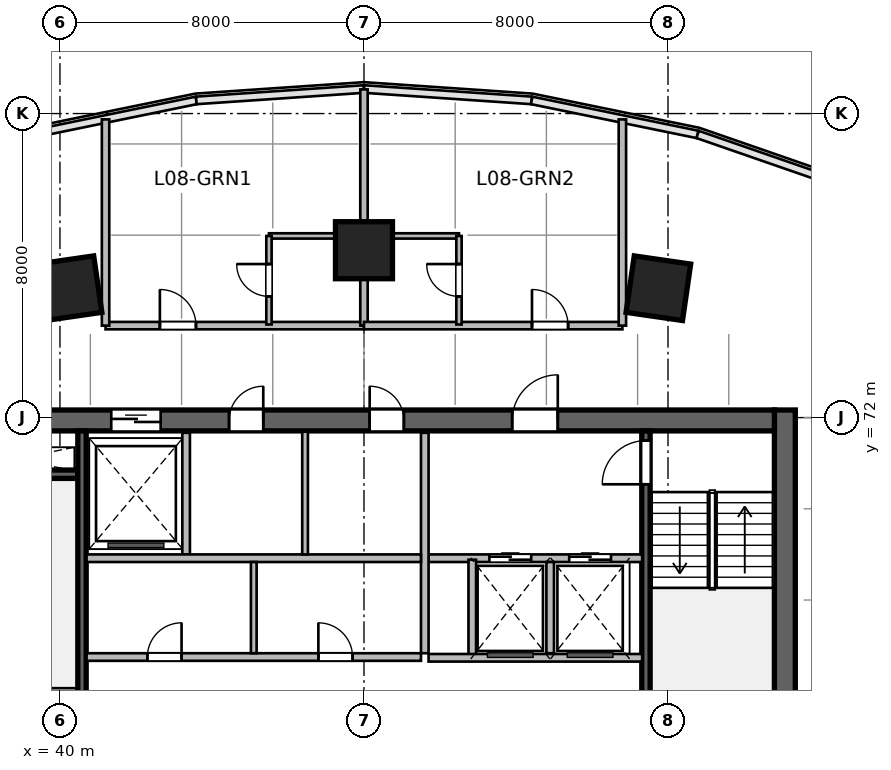
"""IFC4 building model, lengths in metres.
Left out: names, types, materials, properties, quantities, classifications, styles, units other than length and angle.
Written with IfcOpenShell. Run it as: python <this file> out.ifc"""

import sys

from ifc_helpers import new_model, si_unit, direction, frame, frame_2d, origin, origin_2d, place, context, subcontext, project, spatial, rectangle, extrude, source, transform, mapped, element, fill, save


model = new_model("IFC4")
c1 = context("Model", 3, precision=1e-05, world=origin(), true_north=direction((0.0, 1.0)))
c2 = subcontext(c1, "Body", "Model", "MODEL_VIEW")
j1 = project(units=[si_unit("LENGTHUNIT", "METRE"), si_unit("PLANEANGLEUNIT", "RADIAN")], contexts=[c1])
p1 = place(None, origin())
s1 = spatial("IfcSite", under=j1, at=p1, CompositionType="ELEMENT")
p2 = place(p1, origin())
s2 = spatial("IfcBuilding", under=s1, at=p2, CompositionType="ELEMENT")
p3 = place(p2, frame((0.0, 0.0, 42.6)))
s3 = spatial("IfcBuildingStorey", under=s2, at=p3, CompositionType="ELEMENT", Elevation=42.6)
m1 = source(origin(), c2, "Body", "SweptSolid", [
    extrude(rectangle(XDim=12.0, YDim=0.55, at=frame_2d((6.0, 0.0))), origin(), (0.0, 0.0, 1.0), 3.6),
])
p4 = place(p3, frame((59.075, 60.2, 0.0), z_axis=(0.0, 0.0, 1.0), x_axis=(0.0, 1.0, 0.0)))
e1 = element("IfcWall", 1, at=p4, inside=s3, PredefinedType="SHEAR", context=c2, shape_type="MappedRepresentation", body=[
    mapped(m1, transform((0.0, 0.0, 0.0), scale=1.0)),
])
m2 = source(origin(), c2, "Body", "SweptSolid", [
    extrude(rectangle(XDim=21.6, YDim=0.55, at=frame_2d((10.8, 0.0))), origin(), (0.0, 0.0, 1.0), 3.6),
])
p5 = place(p3, frame((37.2, 71.925, 0.0), z_axis=(0.0, 0.0, 1.0), x_axis=(1.0, 0.0, 0.0)))
e2 = element("IfcWall", 2, at=p5, inside=s3, PredefinedType="SHEAR", context=c2, shape_type="MappedRepresentation", body=[
    mapped(m2, transform((0.0, 0.0, 0.0), scale=1.0)),
])
p6 = place(p5, frame((1.2, 0.0, 0.0)))
e3 = element("IfcOpeningElement", 3, at=p6, cuts=e2, PredefinedType="OPENING", context=c2, shape_type="SweptSolid", body=[
    extrude(rectangle(XDim=0.9, YDim=2.1, at=frame_2d((0.45, 1.05))), frame((0.0, 0.285, 0.0), z_axis=(0.0, -1.0, 0.0), x_axis=(1.0, 0.0, 0.0)), (0.0, 0.0, 1.0), 0.57),
])
p7 = place(p5, frame((14.7, 0.0, 0.0)))
e4 = element("IfcOpeningElement", 4, at=p7, cuts=e2, PredefinedType="OPENING", context=c2, shape_type="SweptSolid", body=[
    extrude(rectangle(XDim=1.2, YDim=2.15, at=frame_2d((0.6, 1.075))), frame((0.0, 0.285, 0.0), z_axis=(0.0, -1.0, 0.0), x_axis=(1.0, 0.0, 0.0)), (0.0, 0.0, 1.0), 0.57),
])
p8 = place(p5, frame((4.15, 0.0, 0.0)))
e5 = element("IfcOpeningElement", 5, at=p8, cuts=e2, PredefinedType="OPENING", context=c2, shape_type="SweptSolid", body=[
    extrude(rectangle(XDim=1.3, YDim=2.15, at=frame_2d((0.65, 1.075))), frame((0.0, 0.285, 0.0), z_axis=(0.0, -1.0, 0.0), x_axis=(1.0, 0.0, 0.0)), (0.0, 0.0, 1.0), 0.57),
])
p9 = place(p5, frame((7.25, 0.0, 0.0)))
e6 = element("IfcOpeningElement", 6, at=p9, cuts=e2, PredefinedType="OPENING", context=c2, shape_type="SweptSolid", body=[
    extrude(rectangle(XDim=0.9, YDim=2.1, at=frame_2d((0.45, 1.05))), frame((0.0, 0.285, 0.0), z_axis=(0.0, -1.0, 0.0), x_axis=(1.0, 0.0, 0.0)), (0.0, 0.0, 1.0), 0.57),
])
p10 = place(p5, frame((10.95, 0.0, 0.0)))
e7 = element("IfcOpeningElement", 7, at=p10, cuts=e2, PredefinedType="OPENING", context=c2, shape_type="SweptSolid", body=[
    extrude(rectangle(XDim=0.9, YDim=2.1, at=frame_2d((0.45, 1.05))), frame((0.0, 0.285, 0.0), z_axis=(0.0, -1.0, 0.0), x_axis=(1.0, 0.0, 0.0)), (0.0, 0.0, 1.0), 0.57),
])
m3 = source(origin(), c2, "Body", "SweptSolid", [
    extrude(rectangle(XDim=3.27, YDim=0.22, at=frame_2d((1.635, 0.0))), origin(), (0.0, 0.0, 1.0), 3.6),
])
p11 = place(p3, frame((37.2, 70.51, 0.0), z_axis=(0.0, 0.0, 1.0), x_axis=(1.0, 0.0, 0.0)))
e8 = element("IfcWall", 8, at=p11, inside=s3, PredefinedType="SHEAR", context=c2, shape_type="MappedRepresentation", body=[
    mapped(m3, transform((0.0, 0.0, 0.0), scale=1.0)),
])
m4 = source(origin(), c2, "Body", "SweptSolid", [
    extrude(rectangle(XDim=10.9, YDim=0.22, at=frame_2d((5.45, 0.0))), origin(), (0.0, 0.0, 1.0), 3.6),
])
p12 = place(p3, frame((40.58, 60.75, 0.0), z_axis=(0.0, 0.0, 1.0), x_axis=(0.0, 1.0, 0.0)))
e9 = element("IfcWall", 9, at=p12, inside=s3, PredefinedType="SHEAR", context=c2, shape_type="MappedRepresentation", body=[
    mapped(m4, transform((0.0, 0.0, 0.0), scale=1.0)),
])
p13 = place(p3, frame((55.42, 60.75, 0.0), z_axis=(0.0, 0.0, 1.0), x_axis=(0.0, 1.0, 0.0)))
e10 = element("IfcWall", 10, at=p13, inside=s3, PredefinedType="SHEAR", context=c2, shape_type="MappedRepresentation", body=[
    mapped(m4, transform((0.0, 0.0, 0.0), scale=1.0)),
])
p14 = place(p13, frame((9.495, 0.0, 0.0)))
e11 = element("IfcOpeningElement", 11, at=p14, cuts=e10, PredefinedType="OPENING", context=c2, shape_type="SweptSolid", body=[
    extrude(rectangle(XDim=1.15, YDim=2.15, at=frame_2d((0.575, 1.075))), frame((0.0, 0.12, 0.0), z_axis=(0.0, -1.0, 0.0), x_axis=(1.0, 0.0, 0.0)), (0.0, 0.0, 1.0), 0.24),
])
m5 = source(origin(), c2, "Body", "SweptSolid", [
    extrude(rectangle(XDim=1.5, YDim=1.5, at=origin_2d()), origin(), (0.0, 0.0, 1.0), 3.6),
])
for number, where, z_axis, x_axis in (
    (12, (40.253, 75.404, 0.0), (0.0, 0.0, 1.0), (-0.143, 0.99, 0.0)),
    (13, (48.0, 76.404, 0.0), (0.0, 0.0, 1.0), (0.0, 1.0, 0.0)),
    (14, (55.747, 75.404, 0.0), (0.0, 0.0, 1.0), (0.143, 0.99, 0.0)),
):
    element("IfcColumn", number, at=place(p3, frame(where, z_axis=z_axis, x_axis=x_axis)), inside=s3, PredefinedType="COLUMN", context=c2, shape_type="MappedRepresentation", body=[
        mapped(m5, transform((0.0, 0.0, 0.0), scale=1.0)),
    ])
m6 = source(origin(), c2, "Body", "SweptSolid", [
    extrude(rectangle(XDim=5.62, YDim=0.2, at=frame_2d((2.81, 0.0))), origin(), (0.0, 0.0, 1.0), 3.36),
])
p15 = place(p3, frame((49.7, 68.3, 0.0), z_axis=(0.0, 0.0, 1.0), x_axis=(1.0, 0.0, 0.0)))
e15 = element("IfcWall", 15, at=p15, inside=s3, PredefinedType="SOLIDWALL", context=c2, shape_type="MappedRepresentation", body=[
    mapped(m6, transform((0.0, 0.0, 0.0), scale=1.0)),
])
p16 = place(p15, frame((1.6, 0.0, 0.0)))
e16 = element("IfcOpeningElement", 16, at=p16, cuts=e15, PredefinedType="OPENING", context=c2, shape_type="SweptSolid", body=[
    extrude(rectangle(XDim=1.1, YDim=2.15, at=frame_2d((0.55, 1.075))), frame((0.0, 0.11, 0.0), z_axis=(0.0, -1.0, 0.0), x_axis=(1.0, 0.0, 0.0)), (0.0, 0.0, 1.0), 0.22),
])
p17 = place(p15, frame((3.7, 0.0, 0.0)))
e17 = element("IfcOpeningElement", 17, at=p17, cuts=e15, PredefinedType="OPENING", context=c2, shape_type="SweptSolid", body=[
    extrude(rectangle(XDim=1.1, YDim=2.15, at=frame_2d((0.55, 1.075))), frame((0.0, 0.11, 0.0), z_axis=(0.0, -1.0, 0.0), x_axis=(1.0, 0.0, 0.0)), (0.0, 0.0, 1.0), 0.22),
])
m7 = source(origin(), c2, "Body", "SweptSolid", [
    extrude(rectangle(XDim=5.8, YDim=0.2, at=frame_2d((2.9, 0.0))), origin(), (0.0, 0.0, 1.0), 3.36),
])
p18 = place(p3, frame((49.6, 65.8, 0.0), z_axis=(0.0, 0.0, 1.0), x_axis=(0.0, 1.0, 0.0)))
e18 = element("IfcWall", 18, at=p18, inside=s3, PredefinedType="SOLIDWALL", context=c2, shape_type="MappedRepresentation", body=[
    mapped(m7, transform((0.0, 0.0, 0.0), scale=1.0)),
])
m8 = source(origin(), c2, "Body", "SweptSolid", [
    extrude(rectangle(XDim=2.58, YDim=0.2, at=frame_2d((1.29, 0.0))), origin(), (0.0, 0.0, 1.0), 3.36),
])
p19 = place(p3, frame((50.85, 65.68, 0.0), z_axis=(0.0, 0.0, 1.0), x_axis=(0.0, 1.0, 0.0)))
e19 = element("IfcWall", 19, at=p19, inside=s3, PredefinedType="SOLIDWALL", context=c2, shape_type="MappedRepresentation", body=[
    mapped(m8, transform((0.0, 0.0, 0.0), scale=1.0)),
])
m9 = source(origin(), c2, "Body", "SweptSolid", [
    extrude(rectangle(XDim=2.4, YDim=0.2, at=frame_2d((1.2, 0.0))), origin(), (0.0, 0.0, 1.0), 3.36),
])
p20 = place(p3, frame((52.9, 65.8, 0.0), z_axis=(0.0, 0.0, 1.0), x_axis=(0.0, 1.0, 0.0)))
e20 = element("IfcWall", 20, at=p20, inside=s3, PredefinedType="SOLIDWALL", context=c2, shape_type="MappedRepresentation", body=[
    mapped(m9, transform((0.0, 0.0, 0.0), scale=1.0)),
])
p21 = place(p3, frame((49.7, 65.68, 0.0), z_axis=(0.0, 0.0, 1.0), x_axis=(1.0, 0.0, 0.0)))
e21 = element("IfcWall", 21, at=p21, inside=s3, PredefinedType="SOLIDWALL", context=c2, shape_type="MappedRepresentation", body=[
    mapped(m6, transform((0.0, 0.0, 0.0), scale=1.0)),
])
m10 = source(origin(), c2, "Body", "SweptSolid", [
    extrude(rectangle(XDim=3.2, YDim=0.2, at=frame_2d((1.6, 0.0))), origin(), (0.0, 0.0, 1.0), 3.36),
])
p22 = place(p3, frame((43.32, 68.4, 0.0), z_axis=(0.0, 0.0, 1.0), x_axis=(0.0, 1.0, 0.0)))
e22 = element("IfcWall", 22, at=p22, inside=s3, PredefinedType="SOLIDWALL", context=c2, shape_type="MappedRepresentation", body=[
    mapped(m10, transform((0.0, 0.0, 0.0), scale=1.0)),
])
m11 = source(origin(), c2, "Body", "SweptSolid", [
    extrude(rectangle(XDim=8.8, YDim=0.2, at=frame_2d((4.4, 0.0))), origin(), (0.0, 0.0, 1.0), 3.36),
])
p23 = place(p3, frame((40.7, 68.3, 0.0), z_axis=(0.0, 0.0, 1.0), x_axis=(1.0, 0.0, 0.0)))
e23 = element("IfcWall", 23, at=p23, inside=s3, PredefinedType="SOLIDWALL", context=c2, shape_type="MappedRepresentation", body=[
    mapped(m11, transform((0.0, 0.0, 0.0), scale=1.0)),
])
m12 = source(origin(), c2, "Body", "SweptSolid", [
    extrude(rectangle(XDim=3.23, YDim=0.15, at=frame_2d((1.615, 0.0))), origin(), (0.0, 0.0, 1.0), 3.36),
])
p24 = place(p3, frame((46.45, 68.4, 0.0), z_axis=(0.0, 0.0, 1.0), x_axis=(0.0, 1.0, 0.0)))
e24 = element("IfcWall", 24, at=p24, inside=s3, PredefinedType="PARTITIONING", context=c2, shape_type="MappedRepresentation", body=[
    mapped(m12, transform((0.0, 0.0, 0.0), scale=1.0)),
])
p25 = place(p3, frame((40.7, 65.7, 0.0), z_axis=(0.0, 0.0, 1.0), x_axis=(1.0, 0.0, 0.0)))
e25 = element("IfcWall", 25, at=p25, inside=s3, PredefinedType="SOLIDWALL", context=c2, shape_type="MappedRepresentation", body=[
    mapped(m11, transform((0.0, 0.0, 0.0), scale=1.0)),
])
p26 = place(p25, frame((1.6, 0.0, 0.0)))
e26 = element("IfcOpeningElement", 26, at=p26, cuts=e25, PredefinedType="OPENING", context=c2, shape_type="SweptSolid", body=[
    extrude(rectangle(XDim=0.9, YDim=2.1, at=frame_2d((0.45, 1.05))), frame((0.0, 0.11, 0.0), z_axis=(0.0, -1.0, 0.0), x_axis=(1.0, 0.0, 0.0)), (0.0, 0.0, 1.0), 0.22),
])
p27 = place(p25, frame((6.1, 0.0, 0.0)))
e27 = element("IfcOpeningElement", 27, at=p27, cuts=e25, PredefinedType="OPENING", context=c2, shape_type="SweptSolid", body=[
    extrude(rectangle(XDim=0.9, YDim=2.1, at=frame_2d((0.45, 1.05))), frame((0.0, 0.11, 0.0), z_axis=(0.0, -1.0, 0.0), x_axis=(1.0, 0.0, 0.0)), (0.0, 0.0, 1.0), 0.22),
])
m13 = source(origin(), c2, "Body", "SweptSolid", [
    extrude(rectangle(XDim=2.4, YDim=0.15, at=frame_2d((1.2, 0.0))), origin(), (0.0, 0.0, 1.0), 3.36),
])
p28 = place(p3, frame((45.1, 65.8, 0.0), z_axis=(0.0, 0.0, 1.0), x_axis=(0.0, 1.0, 0.0)))
e28 = element("IfcWall", 28, at=p28, inside=s3, PredefinedType="PARTITIONING", context=c2, shape_type="MappedRepresentation", body=[
    mapped(m13, transform((0.0, 0.0, 0.0), scale=1.0)),
])
m14 = source(origin(), c2, "Body", "SweptSolid", [
    extrude(rectangle(XDim=6.8, YDim=0.195, at=frame_2d((3.4, 0.0))), origin(), (0.0, 0.0, 1.0), 3.36),
])
p29 = place(p3, frame((41.2, 74.42, 0.0), z_axis=(0.0, 0.0, 1.0), x_axis=(1.0, 0.0, 0.0)))
e29 = element("IfcWall", 29, at=p29, inside=s3, PredefinedType="PARTITIONING", context=c2, shape_type="MappedRepresentation", body=[
    mapped(m14, transform((0.0, 0.0, 0.0), scale=1.0)),
])
p30 = place(p29, frame((1.429, 0.0, 0.0)))
e30 = element("IfcOpeningElement", 30, at=p30, cuts=e29, PredefinedType="OPENING", context=c2, shape_type="SweptSolid", body=[
    extrude(rectangle(XDim=0.95, YDim=2.15, at=frame_2d((0.475, 1.075))), frame((0.0, 0.107, 0.0), z_axis=(0.0, -1.0, 0.0), x_axis=(1.0, 0.0, 0.0)), (0.0, 0.0, 1.0), 0.215),
])
m15 = source(origin(), c2, "Body", "SweptSolid", [
    extrude(rectangle(XDim=6.216, YDim=0.195, at=frame_2d((3.108, 0.0))), origin(), (0.0, 0.0, 1.0), 2.644),
])
p31 = place(p3, frame((48.0, 74.42, 0.0), z_axis=(0.0, 0.0, 1.0), x_axis=(0.0, 1.0, 0.0)))
e31 = element("IfcWall", 31, at=p31, inside=s3, PredefinedType="PARTITIONING", context=c2, shape_type="MappedRepresentation", body=[
    mapped(m15, transform((0.0, 0.0, 0.0), scale=1.0)),
])
m16 = source(origin(), c2, "Body", "SweptSolid", [
    extrude(rectangle(XDim=5.426, YDim=0.195, at=frame_2d((2.713, 0.0))), origin(), (0.0, 0.0, 1.0), 3.36),
])
p32 = place(p3, frame((41.2, 74.42, 0.0), z_axis=(0.0, 0.0, 1.0), x_axis=(0.0, 1.0, 0.0)))
e32 = element("IfcWall", 32, at=p32, inside=s3, PredefinedType="PARTITIONING", context=c2, shape_type="MappedRepresentation", body=[
    mapped(m16, transform((0.0, 0.0, 0.0), scale=1.0)),
])
m17 = source(origin(), c2, "Body", "SweptSolid", [
    extrude(rectangle(XDim=2.35, YDim=0.14, at=frame_2d((1.175, 0.0))), origin(), (0.0, 0.0, 1.0), 3.36),
])
p33 = place(p3, frame((45.5, 76.78, 0.0), z_axis=(0.0, 0.0, 1.0), x_axis=(1.0, 0.0, 0.0)))
e33 = element("IfcWall", 33, at=p33, inside=s3, PredefinedType="PARTITIONING", context=c2, shape_type="MappedRepresentation", body=[
    mapped(m17, transform((0.0, 0.0, 0.0), scale=1.0)),
])
m18 = source(origin(), c2, "Body", "SweptSolid", [
    extrude(rectangle(XDim=2.33, YDim=0.14, at=frame_2d((1.165, 0.0))), origin(), (0.0, 0.0, 1.0), 3.36),
])
p34 = place(p3, frame((45.5, 74.45, 0.0), z_axis=(0.0, 0.0, 1.0), x_axis=(0.0, 1.0, 0.0)))
e34 = element("IfcWall", 34, at=p34, inside=s3, PredefinedType="PARTITIONING", context=c2, shape_type="MappedRepresentation", body=[
    mapped(m18, transform((0.0, 0.0, 0.0), scale=1.0)),
])
p35 = place(p34, frame((0.74, 0.0, 0.0)))
e35 = element("IfcOpeningElement", 35, at=p35, cuts=e34, PredefinedType="OPENING", context=c2, shape_type="SweptSolid", body=[
    extrude(rectangle(XDim=0.85, YDim=2.05, at=frame_2d((0.425, 1.025))), frame((0.0, 0.08, 0.0), z_axis=(0.0, -1.0, 0.0), x_axis=(1.0, 0.0, 0.0)), (0.0, 0.0, 1.0), 0.16),
])
p36 = place(p3, frame((48.0, 74.42, 0.0), z_axis=(0.0, 0.0, 1.0), x_axis=(1.0, 0.0, 0.0)))
e36 = element("IfcWall", 36, at=p36, inside=s3, PredefinedType="PARTITIONING", context=c2, shape_type="MappedRepresentation", body=[
    mapped(m14, transform((0.0, 0.0, 0.0), scale=1.0)),
])
p37 = place(p36, frame((4.421, 0.0, 0.0)))
e37 = element("IfcOpeningElement", 37, at=p37, cuts=e36, PredefinedType="OPENING", context=c2, shape_type="SweptSolid", body=[
    extrude(rectangle(XDim=0.95, YDim=2.15, at=frame_2d((0.475, 1.075))), frame((0.0, 0.107, 0.0), z_axis=(0.0, -1.0, 0.0), x_axis=(1.0, 0.0, 0.0)), (0.0, 0.0, 1.0), 0.215),
])
p38 = place(p3, frame((54.8, 74.42, 0.0), z_axis=(0.0, 0.0, 1.0), x_axis=(0.0, 1.0, 0.0)))
e38 = element("IfcWall", 38, at=p38, inside=s3, PredefinedType="PARTITIONING", context=c2, shape_type="MappedRepresentation", body=[
    mapped(m16, transform((0.0, 0.0, 0.0), scale=1.0)),
])
p39 = place(p3, frame((48.15, 76.78, 0.0), z_axis=(0.0, 0.0, 1.0), x_axis=(1.0, 0.0, 0.0)))
e39 = element("IfcWall", 39, at=p39, inside=s3, PredefinedType="PARTITIONING", context=c2, shape_type="MappedRepresentation", body=[
    mapped(m17, transform((0.0, 0.0, 0.0), scale=1.0)),
])
p40 = place(p3, frame((50.5, 74.45, 0.0), z_axis=(0.0, 0.0, 1.0), x_axis=(0.0, 1.0, 0.0)))
e40 = element("IfcWall", 40, at=p40, inside=s3, PredefinedType="PARTITIONING", context=c2, shape_type="MappedRepresentation", body=[
    mapped(m18, transform((0.0, 0.0, 0.0), scale=1.0)),
])
p41 = place(p40, frame((0.74, 0.0, 0.0)))
e41 = element("IfcOpeningElement", 41, at=p41, cuts=e40, PredefinedType="OPENING", context=c2, shape_type="SweptSolid", body=[
    extrude(rectangle(XDim=0.85, YDim=2.05, at=frame_2d((0.425, 1.025))), frame((0.0, 0.08, 0.0), z_axis=(0.0, -1.0, 0.0), x_axis=(1.0, 0.0, 0.0)), (0.0, 0.0, 1.0), 0.16),
])
m19 = source(origin(), c2, "Body", "SweptSolid", [
    extrude(rectangle(XDim=1.15, YDim=2.15, at=frame_2d((0.575, 1.075))), frame((0.0, 0.025, 0.0), z_axis=(0.0, -1.0, 0.0), x_axis=(1.0, 0.0, 0.0)), (0.0, 0.0, 1.0), 0.05),
])
p42 = place(p14, origin())
e42 = element("IfcDoor", 42, at=p42, inside=s3, OperationType="SINGLE_SWING_LEFT", PredefinedType="DOOR", context=c2, shape_type="MappedRepresentation", body=[
    mapped(m19, transform((0.0, 0.0, 0.0), scale=1.0)),
])
fill(e11, e42)
m20 = source(origin(), c2, "Body", "SweptSolid", [
    extrude(rectangle(XDim=1.2, YDim=2.15, at=frame_2d((0.6, 1.075))), frame((0.0, 0.025, 0.0), z_axis=(0.0, -1.0, 0.0), x_axis=(1.0, 0.0, 0.0)), (0.0, 0.0, 1.0), 0.05),
])
p43 = place(p7, origin())
e43 = element("IfcDoor", 43, at=p43, inside=s3, OperationType="SINGLE_SWING_RIGHT", PredefinedType="DOOR", context=c2, shape_type="MappedRepresentation", body=[
    mapped(m20, transform((0.0, 0.0, 0.0), scale=1.0)),
])
fill(e4, e43)
m21 = source(origin(), c2, "Body", "SweptSolid", [
    extrude(rectangle(XDim=1.1, YDim=2.15, at=frame_2d((0.55, 1.075))), frame((0.0, 0.025, 0.0), z_axis=(0.0, -1.0, 0.0), x_axis=(1.0, 0.0, 0.0)), (0.0, 0.0, 1.0), 0.05),
])
p44 = place(p16, origin())
e44 = element("IfcDoor", 44, at=p44, inside=s3, OperationType="DOUBLE_DOOR_SLIDING", PredefinedType="DOOR", context=c2, shape_type="MappedRepresentation", body=[
    mapped(m21, transform((0.0, 0.0, 0.0), scale=1.0)),
])
fill(e16, e44)
p45 = place(p17, origin())
e45 = element("IfcDoor", 45, at=p45, inside=s3, OperationType="DOUBLE_DOOR_SLIDING", PredefinedType="DOOR", context=c2, shape_type="MappedRepresentation", body=[
    mapped(m21, transform((0.0, 0.0, 0.0), scale=1.0)),
])
fill(e17, e45)
m22 = source(origin(), c2, "Body", "SweptSolid", [
    extrude(rectangle(XDim=1.3, YDim=2.15, at=frame_2d((0.65, 1.075))), frame((0.0, 0.025, 0.0), z_axis=(0.0, -1.0, 0.0), x_axis=(1.0, 0.0, 0.0)), (0.0, 0.0, 1.0), 0.05),
])
p46 = place(p8, origin())
e46 = element("IfcDoor", 46, at=p46, inside=s3, OperationType="DOUBLE_DOOR_SLIDING", PredefinedType="DOOR", context=c2, shape_type="MappedRepresentation", body=[
    mapped(m22, transform((0.0, 0.0, 0.0), scale=1.0)),
])
fill(e5, e46)
m23 = source(origin(), c2, "Body", "SweptSolid", [
    extrude(rectangle(XDim=0.9, YDim=2.1, at=frame_2d((0.45, 1.05))), frame((0.0, 0.025, 0.0), z_axis=(0.0, -1.0, 0.0), x_axis=(1.0, 0.0, 0.0)), (0.0, 0.0, 1.0), 0.05),
])
p47 = place(p9, origin())
e47 = element("IfcDoor", 47, at=p47, inside=s3, OperationType="SINGLE_SWING_RIGHT", PredefinedType="DOOR", context=c2, shape_type="MappedRepresentation", body=[
    mapped(m23, transform((0.0, 0.0, 0.0), scale=1.0)),
])
fill(e6, e47)
p48 = place(p10, origin())
e48 = element("IfcDoor", 48, at=p48, inside=s3, OperationType="SINGLE_SWING_LEFT", PredefinedType="DOOR", context=c2, shape_type="MappedRepresentation", body=[
    mapped(m23, transform((0.0, 0.0, 0.0), scale=1.0)),
])
fill(e7, e48)
p49 = place(p26, origin())
e49 = element("IfcDoor", 49, at=p49, inside=s3, OperationType="SINGLE_SWING_RIGHT", PredefinedType="DOOR", context=c2, shape_type="MappedRepresentation", body=[
    mapped(m23, transform((0.0, 0.0, 0.0), scale=1.0)),
])
fill(e26, e49)
p50 = place(p27, origin())
e50 = element("IfcDoor", 50, at=p50, inside=s3, OperationType="SINGLE_SWING_LEFT", PredefinedType="DOOR", context=c2, shape_type="MappedRepresentation", body=[
    mapped(m23, transform((0.0, 0.0, 0.0), scale=1.0)),
])
fill(e27, e50)
m24 = source(origin(), c2, "Body", "SweptSolid", [
    extrude(rectangle(XDim=0.95, YDim=2.15, at=frame_2d((0.475, 1.075))), frame((0.0, 0.025, 0.0), z_axis=(0.0, -1.0, 0.0), x_axis=(1.0, 0.0, 0.0)), (0.0, 0.0, 1.0), 0.05),
])
p51 = place(p30, origin())
e51 = element("IfcDoor", 51, at=p51, inside=s3, OperationType="SINGLE_SWING_LEFT", PredefinedType="DOOR", context=c2, shape_type="MappedRepresentation", body=[
    mapped(m24, transform((0.0, 0.0, 0.0), scale=1.0)),
])
fill(e30, e51)
m25 = source(origin(), c2, "Body", "SweptSolid", [
    extrude(rectangle(XDim=0.85, YDim=2.05, at=frame_2d((0.425, 1.025))), frame((0.0, 0.025, 0.0), z_axis=(0.0, -1.0, 0.0), x_axis=(1.0, 0.0, 0.0)), (0.0, 0.0, 1.0), 0.05),
])
p52 = place(p35, origin())
e52 = element("IfcDoor", 52, at=p52, inside=s3, OperationType="SINGLE_SWING_RIGHT", PredefinedType="DOOR", context=c2, shape_type="MappedRepresentation", body=[
    mapped(m25, transform((0.0, 0.0, 0.0), scale=1.0)),
])
fill(e35, e52)
p53 = place(p37, origin())
e53 = element("IfcDoor", 53, at=p53, inside=s3, OperationType="SINGLE_SWING_LEFT", PredefinedType="DOOR", context=c2, shape_type="MappedRepresentation", body=[
    mapped(m24, transform((0.0, 0.0, 0.0), scale=1.0)),
])
fill(e37, e53)
p54 = place(p41, origin())
e54 = element("IfcDoor", 54, at=p54, inside=s3, OperationType="SINGLE_SWING_RIGHT", PredefinedType="DOOR", context=c2, shape_type="MappedRepresentation", body=[
    mapped(m25, transform((0.0, 0.0, 0.0), scale=1.0)),
])
fill(e41, e54)
save(model, sys.argv[1])
